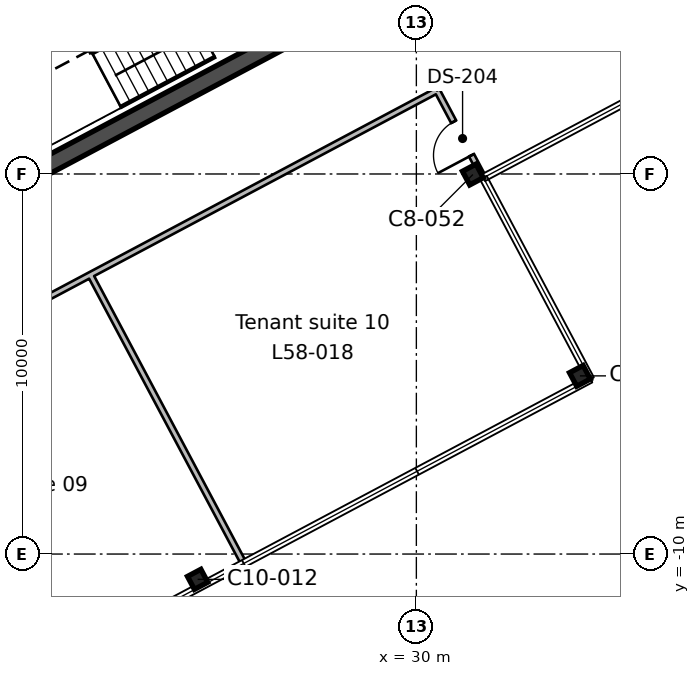
"""IFC4 building model, lengths in metres.
Left out: names, types, materials, properties, quantities, classifications, styles, units other than length and angle.
Written with IfcOpenShell. Run it as: python <this file> out.ifc"""

import sys

from ifc_helpers import new_model, si_unit, direction, frame, frame_2d, origin, origin_2d, place, context, subcontext, project, spatial, rectangle, i_section, extrude, element, fill, save


model = new_model("IFC4")
c1 = context("Model", 3, precision=1e-05, world=origin(), true_north=direction((0.0, 1.0)))
c2 = subcontext(c1, "Body", "Model", "MODEL_VIEW")
j1 = project(units=[si_unit("LENGTHUNIT", "METRE"), si_unit("PLANEANGLEUNIT", "RADIAN")], contexts=[c1])
p1 = place(None, origin())
s1 = spatial("IfcSite", under=j1, at=p1, CompositionType="ELEMENT")
p2 = place(p1, origin())
s2 = spatial("IfcBuilding", under=s1, at=p2, CompositionType="ELEMENT")
p3 = place(p2, frame((0.0, 0.0, 261.9)))
s3 = spatial("IfcBuildingStorey", under=s2, at=p3, CompositionType="ELEMENT", Elevation=261.9)
p4 = place(p3, frame((24.245, -10.666, 0.0), z_axis=(0.0, 0.0, 1.0), x_axis=(0.882947592859, 0.469471562786, 0.0)))
e1 = element("IfcColumn", 1, at=p4, inside=s3, PredefinedType="COLUMN", context=c2, shape_type="SweptSolid", body=[
    extrude(i_section(OverallWidth=0.399, OverallDepth=0.386, WebThickness=0.021, FlangeThickness=0.033, FilletRadius=0.015, at=origin_2d()), origin(), (0.0, 0.0, 1.0), 3.9),
])
for number, where, z_axis, x_axis in (
    (2, (34.304, -5.312, 0.0), (0.0, 0.0, 1.0), (-0.469, 0.883, 0.0)),
    (3, (31.487, -0.014, 0.0), (0.0, 0.0, 1.0), (0.883, 0.469, 0.0)),
):
    element("IfcColumn", number, at=place(p3, frame(where, z_axis=z_axis, x_axis=x_axis)), inside=s3, PredefinedType="COLUMN", context=c2, shape_type="SweptSolid", body=[
        extrude(i_section(OverallWidth=0.404, OverallDepth=0.406, WebThickness=0.027, FlangeThickness=0.044, FilletRadius=0.015, at=origin_2d()), origin(), (0.0, 0.0, 1.0), 3.9),
    ])
p5 = place(p3, frame((19.3, -0.299, 0.0), z_axis=(0.0, 0.0, 1.0), x_axis=(0.88295276571, 0.46946183394, 0.0)))
e4 = element("IfcWall", 4, at=p5, inside=s3, PredefinedType="SHEAR", context=c2, shape_type="SweptSolid", body=[
    extrude(rectangle(XDim=20.2, YDim=0.45, at=frame_2d((10.1, 0.0))), origin(), (0.0, 0.0, 1.0), 3.9),
])
p6 = place(p3, frame((17.434, 3.21, 0.0), z_axis=(0.0, 0.0, 1.0), x_axis=(0.882940221191, 0.469485426614, 0.0)))
e5 = element("IfcWall", 5, at=p6, inside=s3, PredefinedType="SHEAR", context=c2, shape_type="SweptSolid", body=[
    extrude(rectangle(XDim=8.0, YDim=0.2, at=frame_2d((4.0, 0.0))), origin(), (0.0, 0.0, 1.0), 3.9),
])
p7 = place(p3, frame((21.421, -2.654, 0.0), z_axis=(0.0, 0.0, 1.0), x_axis=(0.469445946219, -0.882961212952, 0.0)))
e6 = element("IfcWall", 6, at=p7, inside=s3, PredefinedType="PARTITIONING", context=c2, shape_type="SweptSolid", body=[
    extrude(rectangle(XDim=8.8, YDim=0.15, at=frame_2d((4.4, 0.0))), origin(), (0.0, 0.0, 1.0), 3.54),
])
p8 = place(p3, frame((31.897, -0.347, 0.0), z_axis=(0.0, 0.0, 1.0), x_axis=(-0.469576437406, 0.882891822045, 0.0)))
e7 = element("IfcWall", 7, at=p8, inside=s3, PredefinedType="PARTITIONING", context=c2, shape_type="SweptSolid", body=[
    extrude(rectangle(XDim=2.881, YDim=0.15, at=frame_2d((1.441, 0.0))), origin(), (0.0, 0.0, 1.0), 3.54),
])
p9 = place(p8, frame((0.95, 0.0, 0.0)))
e8 = element("IfcOpeningElement", 8, at=p9, cuts=e7, PredefinedType="OPENING", context=c2, shape_type="SweptSolid", body=[
    extrude(rectangle(XDim=1.0, YDim=2.1, at=frame_2d((0.5, 1.05))), frame((0.0, 0.085, 0.0), z_axis=(0.0, -1.0, 0.0), x_axis=(1.0, 0.0, 0.0)), (0.0, 0.0, 1.0), 0.17),
])
p10 = place(p3, frame((30.544, 2.197, 0.0), z_axis=(0.0, 0.0, 1.0), x_axis=(-0.88293548313, -0.469494337165, 0.0)))
e9 = element("IfcWall", 9, at=p10, inside=s3, PredefinedType="PARTITIONING", context=c2, shape_type="SweptSolid", body=[
    extrude(rectangle(XDim=18.738, YDim=0.15, at=frame_2d((9.369, 0.0))), origin(), (0.0, 0.0, 1.0), 3.54),
])
p11 = place(p9, origin())
e10 = element("IfcDoor", 10, at=p11, inside=s3, OperationType="SINGLE_SWING_LEFT", PredefinedType="DOOR", context=c2, shape_type="SweptSolid", body=[
    extrude(rectangle(XDim=1.0, YDim=2.1, at=frame_2d((0.5, 1.05))), frame((0.0, 0.025, 0.0), z_axis=(0.0, -1.0, 0.0), x_axis=(1.0, 0.0, 0.0)), (0.0, 0.0, 1.0), 0.05),
])
fill(e8, e10)
save(model, sys.argv[1])
